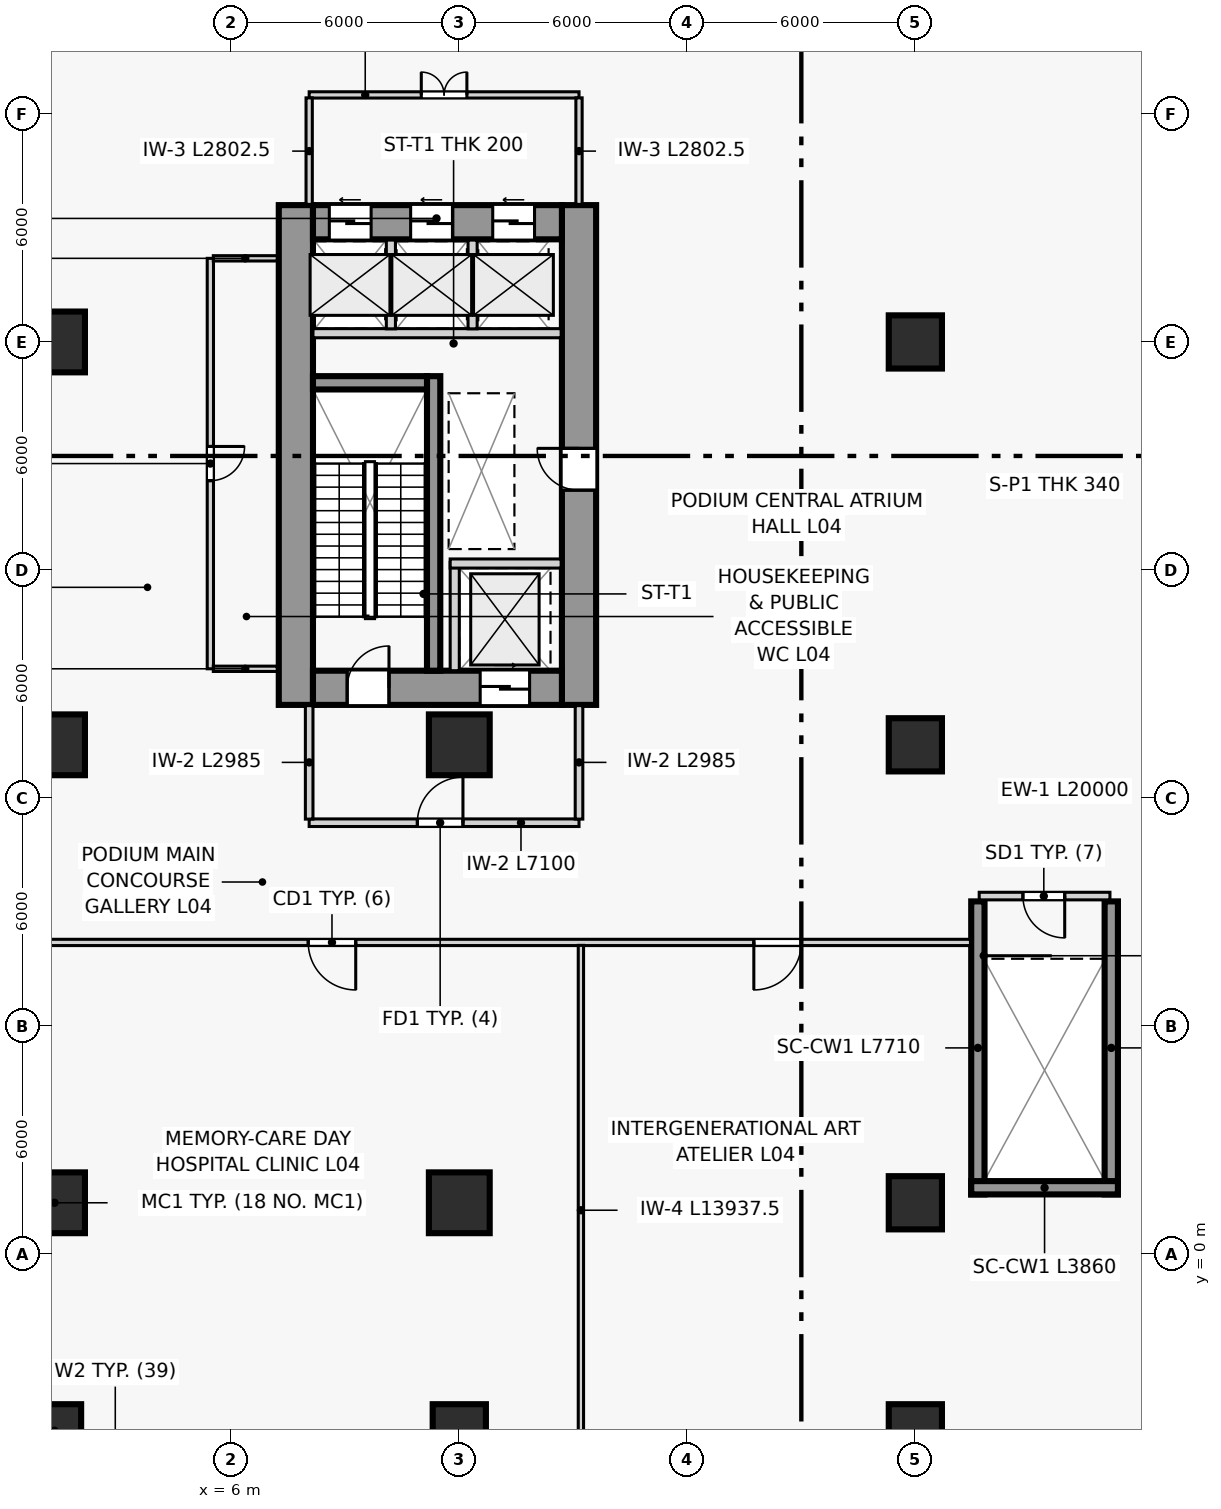
"""IFC4 building model, lengths in metres.
Left out: names, types, materials, properties, quantities, classifications, styles, units other than length and angle.
Written with IfcOpenShell. Run it as: python <this file> out.ifc"""

import sys

from ifc_helpers import new_model, si_unit, direction, frame, frame_2d, origin, origin_2d, place, context, subcontext, project, spatial, rectangle, extrude, source, transform, mapped, element, fill, save


model = new_model("IFC4")
c1 = context("Model", 3, precision=1e-05, world=origin(), true_north=direction((0.0, 1.0)))
c2 = subcontext(c1, "Body", "Model", "MODEL_VIEW")
j1 = project(units=[si_unit("LENGTHUNIT", "METRE"), si_unit("PLANEANGLEUNIT", "RADIAN")], contexts=[c1])
p1 = place(None, origin())
s1 = spatial("IfcSite", under=j1, at=p1, CompositionType="ELEMENT")
p2 = place(p1, origin())
s2 = spatial("IfcBuilding", under=s1, at=p2, CompositionType="ELEMENT")
p3 = place(p2, frame((0.0, 0.0, 18.0)))
s3 = spatial("IfcBuildingStorey", under=s2, at=p3, CompositionType="ELEMENT", Elevation=18.0)
p4 = place(p3, frame((7.7, 14.45, 0.0), z_axis=(0.0, 0.0, 1.0), x_axis=(0.0, 1.0, 0.0)))
e1 = element("IfcWall", 1, at=p4, inside=s3, PredefinedType="SHEAR", context=c2, shape_type="SweptSolid", body=[
    extrude(rectangle(XDim=13.15, YDim=0.9, at=frame_2d((6.575, 0.0))), origin(), (0.0, 0.0, 1.0), 4.5),
])
p5 = place(p3, frame((15.15, 14.45, 0.0), z_axis=(0.0, 0.0, 1.0), x_axis=(0.0, 1.0, 0.0)))
e2 = element("IfcWall", 2, at=p5, inside=s3, PredefinedType="SHEAR", context=c2, shape_type="SweptSolid", body=[
    extrude(rectangle(XDim=13.15, YDim=0.9, at=frame_2d((6.575, 0.0))), origin(), (0.0, 0.0, 1.0), 4.5),
])
p6 = place(p5, frame((5.65, 0.0, 0.0)))
e3 = element("IfcOpeningElement", 3, at=p6, cuts=e2, PredefinedType="OPENING", context=c2, shape_type="SweptSolid", body=[
    extrude(rectangle(XDim=1.1, YDim=2.2, at=frame_2d((0.55, 1.1))), frame((0.0, 0.46, 0.0), z_axis=(0.0, -1.0, 0.0), x_axis=(1.0, 0.0, 0.0)), (0.0, 0.0, 1.0), 0.92),
])
p7 = place(p3, frame((8.15, 14.9, 0.0), z_axis=(0.0, 0.0, 1.0), x_axis=(1.0, 0.0, 0.0)))
e4 = element("IfcWall", 4, at=p7, inside=s3, PredefinedType="SHEAR", context=c2, shape_type="SweptSolid", body=[
    extrude(rectangle(XDim=6.55, YDim=0.9, at=frame_2d((3.275, 0.0))), origin(), (0.0, 0.0, 1.0), 4.5),
])
p8 = place(p7, frame((0.9, 0.0, 0.0)))
e5 = element("IfcOpeningElement", 5, at=p8, cuts=e4, PredefinedType="OPENING", context=c2, shape_type="SweptSolid", body=[
    extrude(rectangle(XDim=1.1, YDim=2.2, at=frame_2d((0.55, 1.1))), frame((0.0, 0.46, 0.0), z_axis=(0.0, -1.0, 0.0), x_axis=(1.0, 0.0, 0.0)), (0.0, 0.0, 1.0), 0.92),
])
p9 = place(p7, frame((4.4, 0.0, 0.0)))
e6 = element("IfcOpeningElement", 6, at=p9, cuts=e4, PredefinedType="OPENING", context=c2, shape_type="SweptSolid", body=[
    extrude(rectangle(XDim=1.3, YDim=2.2, at=frame_2d((0.65, 1.1))), frame((0.0, 0.46, 0.0), z_axis=(0.0, -1.0, 0.0), x_axis=(1.0, 0.0, 0.0)), (0.0, 0.0, 1.0), 0.92),
])
p10 = place(p3, frame((8.15, 27.15, 0.0), z_axis=(0.0, 0.0, 1.0), x_axis=(1.0, 0.0, 0.0)))
e7 = element("IfcWall", 7, at=p10, inside=s3, PredefinedType="SHEAR", context=c2, shape_type="SweptSolid", body=[
    extrude(rectangle(XDim=6.55, YDim=0.9, at=frame_2d((3.275, 0.0))), origin(), (0.0, 0.0, 1.0), 4.5),
])
p11 = place(p10, frame((0.43, 0.0, 0.0)))
e8 = element("IfcOpeningElement", 8, at=p11, cuts=e7, PredefinedType="OPENING", context=c2, shape_type="SweptSolid", body=[
    extrude(rectangle(XDim=1.1, YDim=2.2, at=frame_2d((0.55, 1.1))), frame((0.0, 0.46, 0.0), z_axis=(0.0, -1.0, 0.0), x_axis=(1.0, 0.0, 0.0)), (0.0, 0.0, 1.0), 0.92),
])
p12 = place(p10, frame((2.57, 0.0, 0.0)))
e9 = element("IfcOpeningElement", 9, at=p12, cuts=e7, PredefinedType="OPENING", context=c2, shape_type="SweptSolid", body=[
    extrude(rectangle(XDim=1.1, YDim=2.2, at=frame_2d((0.55, 1.1))), frame((0.0, 0.46, 0.0), z_axis=(0.0, -1.0, 0.0), x_axis=(1.0, 0.0, 0.0)), (0.0, 0.0, 1.0), 0.92),
])
p13 = place(p10, frame((4.73, 0.0, 0.0)))
e10 = element("IfcOpeningElement", 10, at=p13, cuts=e7, PredefinedType="OPENING", context=c2, shape_type="SweptSolid", body=[
    extrude(rectangle(XDim=1.1, YDim=2.2, at=frame_2d((0.55, 1.1))), frame((0.0, 0.46, 0.0), z_axis=(0.0, -1.0, 0.0), x_axis=(1.0, 0.0, 0.0)), (0.0, 0.0, 1.0), 0.92),
])
p14 = place(p3, frame((11.325, 15.35, 0.0), z_axis=(0.0, 0.0, 1.0), x_axis=(0.0, 1.0, 0.0)))
e11 = element("IfcWall", 11, at=p14, inside=s3, PredefinedType="SHEAR", context=c2, shape_type="SweptSolid", body=[
    extrude(rectangle(XDim=7.75, YDim=0.35, at=frame_2d((3.875, 0.0))), origin(), (0.0, 0.0, 1.0), 4.5),
])
p15 = place(p3, frame((8.15, 22.925, 0.0), z_axis=(0.0, 0.0, 1.0), x_axis=(1.0, 0.0, 0.0)))
e12 = element("IfcWall", 12, at=p15, inside=s3, PredefinedType="SHEAR", context=c2, shape_type="SweptSolid", body=[
    extrude(rectangle(XDim=3.0, YDim=0.35, at=frame_2d((1.5, 0.0))), origin(), (0.0, 0.0, 1.0), 4.5),
])
for number, where, z_axis, x_axis in (
    (13, (25.645, 1.57, 0.0), (0.0, 0.0, 1.0), (0.0, 1.0, 0.0)),
    (14, (29.155, 1.57, 0.0), (0.0, 0.0, 1.0), (0.0, 1.0, 0.0)),
):
    element("IfcWall", number, at=place(p3, frame(where, z_axis=z_axis, x_axis=x_axis)), inside=s3, PredefinedType="SHEAR", context=c2, shape_type="SweptSolid", body=[
        extrude(rectangle(XDim=7.71, YDim=0.35, at=frame_2d((3.855, 0.0))), origin(), (0.0, 0.0, 1.0), 4.5),
    ])
p16 = place(p3, frame((25.47, 1.745, 0.0), z_axis=(0.0, 0.0, 1.0), x_axis=(1.0, 0.0, 0.0)))
e15 = element("IfcWall", 15, at=p16, inside=s3, PredefinedType="SHEAR", context=c2, shape_type="SweptSolid", body=[
    extrude(rectangle(XDim=3.86, YDim=0.35, at=frame_2d((1.93, 0.0))), origin(), (0.0, 0.0, 1.0), 4.5),
])
m1 = source(origin(), c2, "Body", "SweptSolid", [
    extrude(rectangle(XDim=1.4, YDim=1.4, at=origin_2d()), origin(), (0.0, 0.0, 1.0), 4.5),
])
p17 = place(p3, frame((1.35, -4.65, 0.0), z_axis=(0.0, 0.0, 1.0), x_axis=(1.0, 0.0, 0.0)))
e16 = element("IfcColumn", 16, at=p17, inside=s3, PredefinedType="COLUMN", context=c2, shape_type="MappedRepresentation", body=[
    mapped(m1, transform((0.0, 0.0, 0.0), scale=1.0)),
])
m2 = source(origin(), c2, "Body", "SweptSolid", [
    extrude(rectangle(XDim=1.6, YDim=1.6, at=origin_2d()), origin(), (0.0, 0.0, 1.0), 4.5),
])
for number, where, z_axis, x_axis in (
    (17, (1.35, 1.35, 0.0), (0.0, 0.0, 1.0), (1.0, 0.0, 0.0)),
    (18, (1.35, 13.4, 0.0), (0.0, 0.0, 1.0), (1.0, 0.0, 0.0)),
    (19, (1.35, 24.0, 0.0), (0.0, 0.0, 1.0), (1.0, 0.0, 0.0)),
):
    element("IfcColumn", number, at=place(p3, frame(where, z_axis=z_axis, x_axis=x_axis)), inside=s3, PredefinedType="COLUMN", context=c2, shape_type="MappedRepresentation", body=[
        mapped(m2, transform((0.0, 0.0, 0.0), scale=1.0)),
    ])
p18 = place(p3, frame((12.0, -4.65, 0.0), z_axis=(0.0, 0.0, 1.0), x_axis=(1.0, 0.0, 0.0)))
e20 = element("IfcColumn", 20, at=p18, inside=s3, PredefinedType="COLUMN", context=c2, shape_type="MappedRepresentation", body=[
    mapped(m1, transform((0.0, 0.0, 0.0), scale=1.0)),
])
for number, where, z_axis, x_axis in (
    (21, (12.0, 1.35, 0.0), (0.0, 0.0, 1.0), (1.0, 0.0, 0.0)),
    (22, (12.0, 13.4, 0.0), (0.0, 0.0, 1.0), (1.0, 0.0, 0.0)),
):
    element("IfcColumn", number, at=place(p3, frame(where, z_axis=z_axis, x_axis=x_axis)), inside=s3, PredefinedType="COLUMN", context=c2, shape_type="MappedRepresentation", body=[
        mapped(m2, transform((0.0, 0.0, 0.0), scale=1.0)),
    ])
for number, where, z_axis, x_axis in (
    (23, (24.0, -4.65, 0.0), (0.0, 0.0, 1.0), (1.0, 0.0, 0.0)),
    (24, (24.0, 1.35, 0.0), (0.0, 0.0, 1.0), (1.0, 0.0, 0.0)),
    (25, (24.0, 13.4, 0.0), (0.0, 0.0, 1.0), (1.0, 0.0, 0.0)),
    (26, (24.0, 24.0, 0.0), (0.0, 0.0, 1.0), (1.0, 0.0, 0.0)),
):
    element("IfcColumn", number, at=place(p3, frame(where, z_axis=z_axis, x_axis=x_axis)), inside=s3, PredefinedType="COLUMN", context=c2, shape_type="MappedRepresentation", body=[
        mapped(m1, transform((0.0, 0.0, 0.0), scale=1.0)),
    ])
p19 = place(p3, frame((11.88, 15.35, 0.0), z_axis=(0.0, 0.0, 1.0), x_axis=(0.0, 1.0, 0.0)))
e27 = element("IfcWall", 27, at=p19, inside=s3, PredefinedType="PARTITIONING", context=c2, shape_type="SweptSolid", body=[
    extrude(rectangle(XDim=2.85, YDim=0.24, at=frame_2d((1.425, 0.0))), origin(), (0.0, 0.0, 1.0), 3.85),
])
p20 = place(p3, frame((11.76, 18.17, 0.0), z_axis=(0.0, 0.0, 1.0), x_axis=(1.0, 0.0, 0.0)))
e28 = element("IfcWall", 28, at=p20, inside=s3, PredefinedType="PARTITIONING", context=c2, shape_type="SweptSolid", body=[
    extrude(rectangle(XDim=2.92, YDim=0.24, at=frame_2d((1.46, 0.0))), origin(), (0.0, 0.0, 1.0), 3.85),
])
p21 = place(p3, frame((8.05, 11.35, 0.0), z_axis=(0.0, 0.0, 1.0), x_axis=(1.0, 0.0, 0.0)))
e29 = element("IfcWall", 29, at=p21, inside=s3, PredefinedType="PARTITIONING", context=c2, shape_type="SweptSolid", body=[
    extrude(rectangle(XDim=7.1, YDim=0.2, at=frame_2d((3.55, 0.0))), origin(), (0.0, 0.0, 1.0), 3.85),
])
p22 = place(p21, frame((2.846, 0.0, 0.0)))
e30 = element("IfcOpeningElement", 30, at=p22, cuts=e29, PredefinedType="OPENING", context=c2, shape_type="SweptSolid", body=[
    extrude(rectangle(XDim=1.2, YDim=2.2, at=frame_2d((0.6, 1.1))), frame((0.0, 0.11, 0.0), z_axis=(0.0, -1.0, 0.0), x_axis=(1.0, 0.0, 0.0)), (0.0, 0.0, 1.0), 0.22),
])
for number, where, z_axis, x_axis in (
    (31, (8.05, 11.445, 0.0), (0.0, 0.0, 1.0), (0.0, 1.0, 0.0)),
    (32, (15.15, 11.445, 0.0), (0.0, 0.0, 1.0), (0.0, 1.0, 0.0)),
):
    element("IfcWall", number, at=place(p3, frame(where, z_axis=z_axis, x_axis=x_axis)), inside=s3, PredefinedType="PARTITIONING", context=c2, shape_type="SweptSolid", body=[
        extrude(rectangle(XDim=2.985, YDim=0.2, at=frame_2d((1.492, 0.0))), origin(), (0.0, 0.0, 1.0), 3.85),
    ])
p23 = place(p3, frame((8.15, 24.23, 0.0), z_axis=(0.0, 0.0, 1.0), x_axis=(1.0, 0.0, 0.0)))
e33 = element("IfcWall", 33, at=p23, inside=s3, PredefinedType="PARTITIONING", context=c2, shape_type="SweptSolid", body=[
    extrude(rectangle(XDim=6.53, YDim=0.24, at=frame_2d((3.265, 0.0))), origin(), (0.0, 0.0, 1.0), 3.85),
])
for number, where, z_axis, x_axis in (
    (34, (10.2, 24.345, 0.0), (0.0, 0.0, 1.0), (0.0, 1.0, 0.0)),
    (35, (12.35, 24.345, 0.0), (0.0, 0.0, 1.0), (0.0, 1.0, 0.0)),
):
    element("IfcWall", number, at=place(p3, frame(where, z_axis=z_axis, x_axis=x_axis)), inside=s3, PredefinedType="PARTITIONING", context=c2, shape_type="SweptSolid", body=[
        extrude(rectangle(XDim=2.335, YDim=0.24, at=frame_2d((1.167, 0.0))), origin(), (0.0, 0.0, 1.0), 3.85),
    ])
p24 = place(p3, frame((8.05, 30.5, 0.0), z_axis=(0.0, 0.0, 1.0), x_axis=(1.0, 0.0, 0.0)))
e36 = element("IfcWall", 36, at=p24, inside=s3, PredefinedType="PARTITIONING", context=c2, shape_type="SweptSolid", body=[
    extrude(rectangle(XDim=7.1, YDim=0.165, at=frame_2d((3.55, 0.0))), origin(), (0.0, 0.0, 1.0), 3.85),
])
p25 = place(p24, frame((2.95, 0.0, 0.0)))
e37 = element("IfcOpeningElement", 37, at=p25, cuts=e36, PredefinedType="OPENING", context=c2, shape_type="SweptSolid", body=[
    extrude(rectangle(XDim=1.2, YDim=2.2, at=frame_2d((0.6, 1.1))), frame((0.0, 0.093, 0.0), z_axis=(0.0, -1.0, 0.0), x_axis=(1.0, 0.0, 0.0)), (0.0, 0.0, 1.0), 0.185),
])
for number, where, z_axis, x_axis in (
    (38, (8.05, 27.62, 0.0), (0.0, 0.0, 1.0), (0.0, 1.0, 0.0)),
    (39, (15.15, 27.62, 0.0), (0.0, 0.0, 1.0), (0.0, 1.0, 0.0)),
):
    element("IfcWall", number, at=place(p3, frame(where, z_axis=z_axis, x_axis=x_axis)), inside=s3, PredefinedType="PARTITIONING", context=c2, shape_type="SweptSolid", body=[
        extrude(rectangle(XDim=2.802, YDim=0.165, at=frame_2d((1.401, 0.0))), origin(), (0.0, 0.0, 1.0), 3.85),
    ])
p26 = place(p3, frame((5.45, 15.4, 0.0), z_axis=(0.0, 0.0, 1.0), x_axis=(0.0, 1.0, 0.0)))
e40 = element("IfcWall", 40, at=p26, inside=s3, PredefinedType="PARTITIONING", context=c2, shape_type="SweptSolid", body=[
    extrude(rectangle(XDim=10.8, YDim=0.165, at=frame_2d((5.4, 0.0))), origin(), (0.0, 0.0, 1.0), 3.85),
])
p27 = place(p26, frame((4.95, 0.0, 0.0)))
e41 = element("IfcOpeningElement", 41, at=p27, cuts=e40, PredefinedType="OPENING", context=c2, shape_type="SweptSolid", body=[
    extrude(rectangle(XDim=0.9, YDim=2.1, at=frame_2d((0.45, 1.05))), frame((0.0, 0.093, 0.0), z_axis=(0.0, -1.0, 0.0), x_axis=(1.0, 0.0, 0.0)), (0.0, 0.0, 1.0), 0.185),
])
for number, where, z_axis, x_axis in (
    (42, (5.528, 15.4, 0.0), (0.0, 0.0, 1.0), (1.0, 0.0, 0.0)),
    (43, (5.528, 26.2, 0.0), (0.0, 0.0, 1.0), (1.0, 0.0, 0.0)),
):
    element("IfcWall", number, at=place(p3, frame(where, z_axis=z_axis, x_axis=x_axis)), inside=s3, PredefinedType="PARTITIONING", context=c2, shape_type="SweptSolid", body=[
        extrude(rectangle(XDim=1.682, YDim=0.14, at=frame_2d((0.841, 0.0))), origin(), (0.0, 0.0, 1.0), 3.85),
    ])
p28 = place(p3, frame((25.68, 9.42, 0.0), z_axis=(0.0, 0.0, 1.0), x_axis=(1.0, 0.0, 0.0)))
e44 = element("IfcWall", 44, at=p28, inside=s3, PredefinedType="PARTITIONING", context=c2, shape_type="SweptSolid", body=[
    extrude(rectangle(XDim=3.44, YDim=0.2, at=frame_2d((1.72, 0.0))), origin(), (0.0, 0.0, 1.0), 3.85),
])
p29 = place(p28, frame((1.15, 0.0, 0.0)))
e45 = element("IfcOpeningElement", 45, at=p29, cuts=e44, PredefinedType="OPENING", context=c2, shape_type="SweptSolid", body=[
    extrude(rectangle(XDim=1.1, YDim=2.2, at=frame_2d((0.55, 1.1))), frame((0.0, 0.11, 0.0), z_axis=(0.0, -1.0, 0.0), x_axis=(1.0, 0.0, 0.0)), (0.0, 0.0, 1.0), 0.22),
])
p30 = place(p3, frame((0.185, 8.2, 0.0), z_axis=(0.0, 0.0, 1.0), x_axis=(1.0, 0.0, 0.0)))
e46 = element("IfcWall", 46, at=p30, inside=s3, PredefinedType="PARTITIONING", context=c2, shape_type="SweptSolid", body=[
    extrude(rectangle(XDim=25.265, YDim=0.165, at=frame_2d((12.632, 0.0))), origin(), (0.0, 0.0, 1.0), 3.85),
])
p31 = place(p30, frame((7.84, 0.0, 0.0)))
e47 = element("IfcOpeningElement", 47, at=p31, cuts=e46, PredefinedType="OPENING", context=c2, shape_type="SweptSolid", body=[
    extrude(rectangle(XDim=1.25, YDim=2.2, at=frame_2d((0.625, 1.1))), frame((0.0, 0.093, 0.0), z_axis=(0.0, -1.0, 0.0), x_axis=(1.0, 0.0, 0.0)), (0.0, 0.0, 1.0), 0.185),
])
p32 = place(p30, frame((19.565, 0.0, 0.0)))
e48 = element("IfcOpeningElement", 48, at=p32, cuts=e46, PredefinedType="OPENING", context=c2, shape_type="SweptSolid", body=[
    extrude(rectangle(XDim=1.25, YDim=2.2, at=frame_2d((0.625, 1.1))), frame((0.0, 0.093, 0.0), z_axis=(0.0, -1.0, 0.0), x_axis=(1.0, 0.0, 0.0)), (0.0, 0.0, 1.0), 0.185),
])
p33 = place(p3, frame((15.2, -5.815, 0.0), z_axis=(0.0, 0.0, 1.0), x_axis=(0.0, 1.0, 0.0)))
e49 = element("IfcWall", 49, at=p33, inside=s3, PredefinedType="PARTITIONING", context=c2, shape_type="SweptSolid", body=[
    extrude(rectangle(XDim=13.938, YDim=0.14, at=frame_2d((6.969, 0.0))), origin(), (0.0, 0.0, 1.0), 3.85),
])
m3 = source(origin(), c2, "Body", "SweptSolid", [
    extrude(rectangle(XDim=1.1, YDim=2.2, at=frame_2d((0.55, 1.1))), frame((0.0, 0.025, 0.0), z_axis=(0.0, -1.0, 0.0), x_axis=(1.0, 0.0, 0.0)), (0.0, 0.0, 1.0), 0.05),
])
p34 = place(p8, origin())
e50 = element("IfcDoor", 50, at=p34, inside=s3, OperationType="SINGLE_SWING_RIGHT", PredefinedType="DOOR", context=c2, shape_type="MappedRepresentation", body=[
    mapped(m3, transform((0.0, 0.0, 0.0), scale=1.0)),
])
fill(e5, e50)
m4 = source(origin(), c2, "Body", "SweptSolid", [
    extrude(rectangle(XDim=1.3, YDim=2.2, at=frame_2d((0.65, 1.1))), frame((0.0, 0.025, 0.0), z_axis=(0.0, -1.0, 0.0), x_axis=(1.0, 0.0, 0.0)), (0.0, 0.0, 1.0), 0.05),
])
p35 = place(p9, origin())
e51 = element("IfcDoor", 51, at=p35, inside=s3, OperationType="SLIDING_TO_RIGHT", PredefinedType="DOOR", context=c2, shape_type="MappedRepresentation", body=[
    mapped(m4, transform((0.0, 0.0, 0.0), scale=1.0)),
])
fill(e6, e51)
m5 = source(origin(), c2, "Body", "SweptSolid", [
    extrude(rectangle(XDim=1.2, YDim=2.2, at=frame_2d((0.6, 1.1))), frame((0.0, 0.025, 0.0), z_axis=(0.0, -1.0, 0.0), x_axis=(1.0, 0.0, 0.0)), (0.0, 0.0, 1.0), 0.05),
])
p36 = place(p22, origin())
e52 = element("IfcDoor", 52, at=p36, inside=s3, OperationType="SINGLE_SWING_RIGHT", PredefinedType="DOOR", context=c2, shape_type="MappedRepresentation", body=[
    mapped(m5, transform((0.0, 0.0, 0.0), scale=1.0)),
])
fill(e30, e52)
m6 = source(origin(), c2, "Body", "SweptSolid", [
    extrude(rectangle(XDim=1.1, YDim=2.2, at=frame_2d((0.55, 1.1))), frame((0.0, 0.025, 0.0), z_axis=(0.0, -1.0, 0.0), x_axis=(1.0, 0.0, 0.0)), (0.0, 0.0, 1.0), 0.05),
])
p37 = place(p11, origin())
e53 = element("IfcDoor", 53, at=p37, inside=s3, OperationType="SLIDING_TO_LEFT", PredefinedType="DOOR", context=c2, shape_type="MappedRepresentation", body=[
    mapped(m6, transform((0.0, 0.0, 0.0), scale=1.0)),
])
fill(e8, e53)
p38 = place(p12, origin())
e54 = element("IfcDoor", 54, at=p38, inside=s3, OperationType="SLIDING_TO_LEFT", PredefinedType="DOOR", context=c2, shape_type="MappedRepresentation", body=[
    mapped(m6, transform((0.0, 0.0, 0.0), scale=1.0)),
])
fill(e9, e54)
p39 = place(p13, origin())
e55 = element("IfcDoor", 55, at=p39, inside=s3, OperationType="SLIDING_TO_LEFT", PredefinedType="DOOR", context=c2, shape_type="MappedRepresentation", body=[
    mapped(m6, transform((0.0, 0.0, 0.0), scale=1.0)),
])
fill(e10, e55)
p40 = place(p25, origin())
e56 = element("IfcDoor", 56, at=p40, inside=s3, OperationType="DOUBLE_DOOR_SINGLE_SWING", PredefinedType="DOOR", context=c2, shape_type="MappedRepresentation", body=[
    mapped(m5, transform((0.0, 0.0, 0.0), scale=1.0)),
])
fill(e37, e56)
p41 = place(p6, origin())
e57 = element("IfcDoor", 57, at=p41, inside=s3, OperationType="SINGLE_SWING_RIGHT", PredefinedType="DOOR", context=c2, shape_type="MappedRepresentation", body=[
    mapped(m3, transform((0.0, 0.0, 0.0), scale=1.0)),
])
fill(e3, e57)
m7 = source(origin(), c2, "Body", "SweptSolid", [
    extrude(rectangle(XDim=0.9, YDim=2.1, at=frame_2d((0.45, 1.05))), frame((0.0, 0.025, 0.0), z_axis=(0.0, -1.0, 0.0), x_axis=(1.0, 0.0, 0.0)), (0.0, 0.0, 1.0), 0.05),
])
p42 = place(p27, frame((0.9, 0.0, 0.0), z_axis=(0.0, 0.0, 1.0), x_axis=(-1.0, 0.0, 0.0)))
e58 = element("IfcDoor", 58, at=p42, inside=s3, OperationType="SINGLE_SWING_LEFT", PredefinedType="DOOR", context=c2, shape_type="MappedRepresentation", body=[
    mapped(m7, transform((0.0, 0.0, 0.0), scale=1.0)),
])
fill(e41, e58)
p43 = place(p29, frame((1.1, 0.0, 0.0), z_axis=(0.0, 0.0, 1.0), x_axis=(-1.0, 0.0, 0.0)))
e59 = element("IfcDoor", 59, at=p43, inside=s3, OperationType="SINGLE_SWING_LEFT", PredefinedType="DOOR", context=c2, shape_type="MappedRepresentation", body=[
    mapped(m3, transform((0.0, 0.0, 0.0), scale=1.0)),
])
fill(e45, e59)
m8 = source(origin(), c2, "Body", "SweptSolid", [
    extrude(rectangle(XDim=1.25, YDim=2.2, at=frame_2d((0.625, 1.1))), frame((0.0, 0.025, 0.0), z_axis=(0.0, -1.0, 0.0), x_axis=(1.0, 0.0, 0.0)), (0.0, 0.0, 1.0), 0.05),
])
p44 = place(p31, frame((1.25, 0.0, 0.0), z_axis=(0.0, 0.0, 1.0), x_axis=(-1.0, 0.0, 0.0)))
e60 = element("IfcDoor", 60, at=p44, inside=s3, OperationType="SINGLE_SWING_LEFT", PredefinedType="DOOR", context=c2, shape_type="MappedRepresentation", body=[
    mapped(m8, transform((0.0, 0.0, 0.0), scale=1.0)),
])
fill(e47, e60)
p45 = place(p32, frame((1.25, 0.0, 0.0), z_axis=(0.0, 0.0, 1.0), x_axis=(-1.0, 0.0, 0.0)))
e61 = element("IfcDoor", 61, at=p45, inside=s3, OperationType="SINGLE_SWING_RIGHT", PredefinedType="DOOR", context=c2, shape_type="MappedRepresentation", body=[
    mapped(m8, transform((0.0, 0.0, 0.0), scale=1.0)),
])
fill(e48, e61)
save(model, sys.argv[1])
